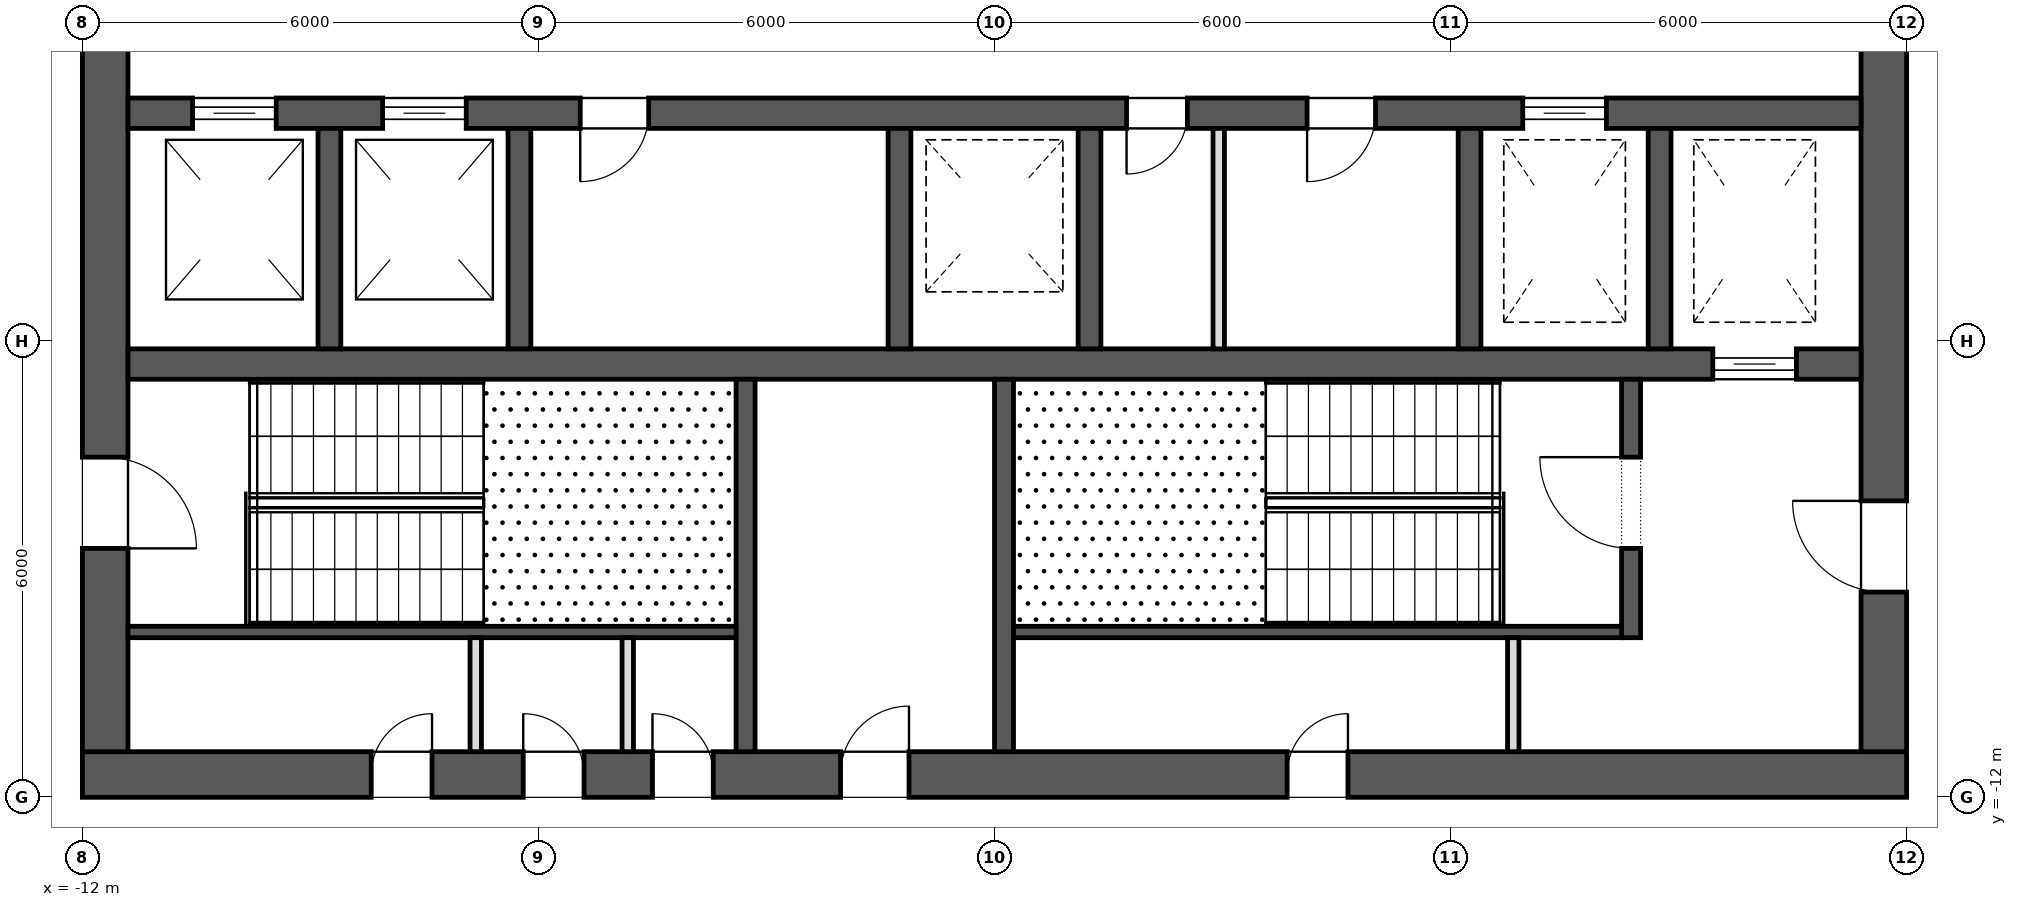
"""IFC4 building model, lengths in metres.
Left out: names, types, materials, properties, quantities, classifications, styles, units other than length and angle.
Written with IfcOpenShell. Run it as: python <this file> out.ifc"""

import sys

from ifc_helpers import new_model, si_unit, direction, frame, frame_2d, origin, place, context, subcontext, project, spatial, rectangle, extrude, element, fill, save


model = new_model("IFC4")
c1 = context("Model", 3, precision=1e-05, world=origin(), true_north=direction((0.0, 1.0)))
c2 = subcontext(c1, "Body", "Model", "MODEL_VIEW")
j1 = project(units=[si_unit("LENGTHUNIT", "METRE"), si_unit("PLANEANGLEUNIT", "RADIAN")], contexts=[c1])
p1 = place(None, origin())
s1 = spatial("IfcSite", under=j1, at=p1, CompositionType="ELEMENT")
p2 = place(p1, origin())
s2 = spatial("IfcBuilding", under=s1, at=p2, CompositionType="ELEMENT")
p3 = place(p2, frame((0.0, 0.0, 312.3)))
s3 = spatial("IfcBuildingStorey", under=s2, at=p3, CompositionType="ELEMENT", Elevation=312.3)
p4 = place(p3, frame((-12.0, -11.7, 0.0), z_axis=(0.0, 0.0, 1.0), x_axis=(1.0, 0.0, 0.0)))
e1 = element("IfcWall", 1, at=p4, inside=s3, PredefinedType="SHEAR", context=c2, shape_type="SweptSolid", body=[
    extrude(rectangle(XDim=24.0, YDim=0.6, at=frame_2d((12.0, 0.0))), origin(), (0.0, 0.0, 1.0), 4.0),
])
p5 = place(p4, frame((9.975, 0.0, 0.0)))
e2 = element("IfcOpeningElement", 2, at=p5, cuts=e1, PredefinedType="OPENING", context=c2, shape_type="SweptSolid", body=[
    extrude(rectangle(XDim=0.9, YDim=2.1, at=frame_2d((0.45, 1.05))), frame((0.0, 0.312, 0.0), z_axis=(0.0, -1.0, 0.0), x_axis=(1.0, 0.0, 0.0)), (0.0, 0.0, 1.0), 0.624),
])
p6 = place(p4, frame((3.8, 0.0, 0.0)))
e3 = element("IfcOpeningElement", 3, at=p6, cuts=e1, PredefinedType="OPENING", context=c2, shape_type="SweptSolid", body=[
    extrude(rectangle(XDim=0.8, YDim=2.1, at=frame_2d((0.4, 1.05))), frame((0.0, 0.312, 0.0), z_axis=(0.0, -1.0, 0.0), x_axis=(1.0, 0.0, 0.0)), (0.0, 0.0, 1.0), 0.624),
])
p7 = place(p4, frame((5.8, 0.0, 0.0)))
e4 = element("IfcOpeningElement", 4, at=p7, cuts=e1, PredefinedType="OPENING", context=c2, shape_type="SweptSolid", body=[
    extrude(rectangle(XDim=0.8, YDim=2.1, at=frame_2d((0.4, 1.05))), frame((0.0, 0.312, 0.0), z_axis=(0.0, -1.0, 0.0), x_axis=(1.0, 0.0, 0.0)), (0.0, 0.0, 1.0), 0.624),
])
p8 = place(p4, frame((7.5, 0.0, 0.0)))
e5 = element("IfcOpeningElement", 5, at=p8, cuts=e1, PredefinedType="OPENING", context=c2, shape_type="SweptSolid", body=[
    extrude(rectangle(XDim=0.8, YDim=2.1, at=frame_2d((0.4, 1.05))), frame((0.0, 0.312, 0.0), z_axis=(0.0, -1.0, 0.0), x_axis=(1.0, 0.0, 0.0)), (0.0, 0.0, 1.0), 0.624),
])
p9 = place(p4, frame((15.85, 0.0, 0.0)))
e6 = element("IfcOpeningElement", 6, at=p9, cuts=e1, PredefinedType="OPENING", context=c2, shape_type="SweptSolid", body=[
    extrude(rectangle(XDim=0.8, YDim=2.1, at=frame_2d((0.4, 1.05))), frame((0.0, 0.312, 0.0), z_axis=(0.0, -1.0, 0.0), x_axis=(1.0, 0.0, 0.0)), (0.0, 0.0, 1.0), 0.624),
])
p10 = place(p3, frame((11.7, -11.4, 0.0), z_axis=(0.0, 0.0, 1.0), x_axis=(0.0, 1.0, 0.0)))
e7 = element("IfcWall", 7, at=p10, inside=s3, PredefinedType="SHEAR", context=c2, shape_type="SweptSolid", body=[
    extrude(rectangle(XDim=22.8, YDim=0.6, at=frame_2d((11.4, 0.0))), origin(), (0.0, 0.0, 1.0), 4.0),
])
p11 = place(p10, frame((10.2, 0.0, 0.0)))
e8 = element("IfcOpeningElement", 8, at=p11, cuts=e7, PredefinedType="OPENING", context=c2, shape_type="SweptSolid", body=[
    extrude(rectangle(XDim=2.4, YDim=2.1, at=frame_2d((1.2, 1.05))), frame((0.0, 0.312, 0.0), z_axis=(0.0, -1.0, 0.0), x_axis=(1.0, 0.0, 0.0)), (0.0, 0.0, 1.0), 0.624),
])
p12 = place(p10, frame((19.5, 0.0, 0.0)))
e9 = element("IfcOpeningElement", 9, at=p12, cuts=e7, PredefinedType="OPENING", context=c2, shape_type="SweptSolid", body=[
    extrude(rectangle(XDim=1.2, YDim=2.1, at=frame_2d((0.6, 1.05))), frame((0.0, 0.312, 0.0), z_axis=(0.0, -1.0, 0.0), x_axis=(1.0, 0.0, 0.0)), (0.0, 0.0, 1.0), 0.624),
])
p13 = place(p10, frame((2.1, 0.0, 0.0)))
e10 = element("IfcOpeningElement", 10, at=p13, cuts=e7, PredefinedType="OPENING", context=c2, shape_type="SweptSolid", body=[
    extrude(rectangle(XDim=1.2, YDim=2.1, at=frame_2d((0.6, 1.05))), frame((0.0, 0.312, 0.0), z_axis=(0.0, -1.0, 0.0), x_axis=(1.0, 0.0, 0.0)), (0.0, 0.0, 1.0), 0.624),
])
p14 = place(p3, frame((-11.7, -11.4, 0.0), z_axis=(0.0, 0.0, 1.0), x_axis=(0.0, 1.0, 0.0)))
e11 = element("IfcWall", 11, at=p14, inside=s3, PredefinedType="SHEAR", context=c2, shape_type="SweptSolid", body=[
    extrude(rectangle(XDim=22.8, YDim=0.6, at=frame_2d((11.4, 0.0))), origin(), (0.0, 0.0, 1.0), 4.0),
])
p15 = place(p14, frame((10.2, 0.0, 0.0)))
e12 = element("IfcOpeningElement", 12, at=p15, cuts=e11, PredefinedType="OPENING", context=c2, shape_type="SweptSolid", body=[
    extrude(rectangle(XDim=2.4, YDim=2.1, at=frame_2d((1.2, 1.05))), frame((0.0, 0.312, 0.0), z_axis=(0.0, -1.0, 0.0), x_axis=(1.0, 0.0, 0.0)), (0.0, 0.0, 1.0), 0.624),
])
p16 = place(p14, frame((18.925, 0.0, 0.0)))
e13 = element("IfcOpeningElement", 13, at=p16, cuts=e11, PredefinedType="OPENING", context=c2, shape_type="SweptSolid", body=[
    extrude(rectangle(XDim=1.2, YDim=2.1, at=frame_2d((0.6, 1.05))), frame((0.0, 0.312, 0.0), z_axis=(0.0, -1.0, 0.0), x_axis=(1.0, 0.0, 0.0)), (0.0, 0.0, 1.0), 0.624),
])
p17 = place(p14, frame((2.675, 0.0, 0.0)))
e14 = element("IfcOpeningElement", 14, at=p17, cuts=e11, PredefinedType="OPENING", context=c2, shape_type="SweptSolid", body=[
    extrude(rectangle(XDim=1.2, YDim=2.1, at=frame_2d((0.6, 1.05))), frame((0.0, 0.312, 0.0), z_axis=(0.0, -1.0, 0.0), x_axis=(1.0, 0.0, 0.0)), (0.0, 0.0, 1.0), 0.624),
])
p18 = place(p3, frame((-11.4, -3.0, 0.0), z_axis=(0.0, 0.0, 1.0), x_axis=(1.0, 0.0, 0.0)))
e15 = element("IfcWall", 15, at=p18, inside=s3, PredefinedType="SHEAR", context=c2, shape_type="SweptSolid", body=[
    extrude(rectangle(XDim=22.8, YDim=0.4, at=frame_2d((11.4, 0.0))), origin(), (0.0, 0.0, 1.0), 4.0),
])
p19 = place(p18, frame((0.85, 0.0, 0.0)))
e16 = element("IfcOpeningElement", 16, at=p19, cuts=e15, PredefinedType="OPENING", context=c2, shape_type="SweptSolid", body=[
    extrude(rectangle(XDim=1.1, YDim=2.1, at=frame_2d((0.55, 1.05))), frame((0.0, 0.212, 0.0), z_axis=(0.0, -1.0, 0.0), x_axis=(1.0, 0.0, 0.0)), (0.0, 0.0, 1.0), 0.424),
])
p20 = place(p18, frame((3.35, 0.0, 0.0)))
e17 = element("IfcOpeningElement", 17, at=p20, cuts=e15, PredefinedType="OPENING", context=c2, shape_type="SweptSolid", body=[
    extrude(rectangle(XDim=1.1, YDim=2.1, at=frame_2d((0.55, 1.05))), frame((0.0, 0.212, 0.0), z_axis=(0.0, -1.0, 0.0), x_axis=(1.0, 0.0, 0.0)), (0.0, 0.0, 1.0), 0.424),
])
p21 = place(p18, frame((18.35, 0.0, 0.0)))
e18 = element("IfcOpeningElement", 18, at=p21, cuts=e15, PredefinedType="OPENING", context=c2, shape_type="SweptSolid", body=[
    extrude(rectangle(XDim=1.1, YDim=2.1, at=frame_2d((0.55, 1.05))), frame((0.0, 0.212, 0.0), z_axis=(0.0, -1.0, 0.0), x_axis=(1.0, 0.0, 0.0)), (0.0, 0.0, 1.0), 0.424),
])
p22 = place(p18, frame((13.137, 0.0, 0.0)))
e19 = element("IfcOpeningElement", 19, at=p22, cuts=e15, PredefinedType="OPENING", context=c2, shape_type="SweptSolid", body=[
    extrude(rectangle(XDim=0.8, YDim=2.1, at=frame_2d((0.4, 1.05))), frame((0.0, 0.212, 0.0), z_axis=(0.0, -1.0, 0.0), x_axis=(1.0, 0.0, 0.0)), (0.0, 0.0, 1.0), 0.424),
])
p23 = place(p18, frame((15.512, 0.0, 0.0)))
e20 = element("IfcOpeningElement", 20, at=p23, cuts=e15, PredefinedType="OPENING", context=c2, shape_type="SweptSolid", body=[
    extrude(rectangle(XDim=0.9, YDim=2.1, at=frame_2d((0.45, 1.05))), frame((0.0, 0.212, 0.0), z_axis=(0.0, -1.0, 0.0), x_axis=(1.0, 0.0, 0.0)), (0.0, 0.0, 1.0), 0.424),
])
p24 = place(p18, frame((5.95, 0.0, 0.0)))
e21 = element("IfcOpeningElement", 21, at=p24, cuts=e15, PredefinedType="OPENING", context=c2, shape_type="SweptSolid", body=[
    extrude(rectangle(XDim=0.9, YDim=2.1, at=frame_2d((0.45, 1.05))), frame((0.0, 0.212, 0.0), z_axis=(0.0, -1.0, 0.0), x_axis=(1.0, 0.0, 0.0)), (0.0, 0.0, 1.0), 0.424),
])
p25 = place(p3, frame((-11.4, -6.3, 0.0), z_axis=(0.0, 0.0, 1.0), x_axis=(1.0, 0.0, 0.0)))
e22 = element("IfcWall", 22, at=p25, inside=s3, PredefinedType="SHEAR", context=c2, shape_type="SweptSolid", body=[
    extrude(rectangle(XDim=22.8, YDim=0.4, at=frame_2d((11.4, 0.0))), origin(), (0.0, 0.0, 1.0), 4.0),
])
p26 = place(p25, frame((20.85, 0.0, 0.0)))
e23 = element("IfcOpeningElement", 23, at=p26, cuts=e22, PredefinedType="OPENING", context=c2, shape_type="SweptSolid", body=[
    extrude(rectangle(XDim=1.1, YDim=2.1, at=frame_2d((0.55, 1.05))), frame((0.0, 0.212, 0.0), z_axis=(0.0, -1.0, 0.0), x_axis=(1.0, 0.0, 0.0)), (0.0, 0.0, 1.0), 0.424),
])
for number, where, z_axis, x_axis in (
    (24, (-8.75, -6.1, 0.0), (0.0, 0.0, 1.0), (0.0, 1.0, 0.0)),
    (25, (-6.25, -6.1, 0.0), (0.0, 0.0, 1.0), (0.0, 1.0, 0.0)),
    (26, (-1.25, -6.1, 0.0), (0.0, 0.0, 1.0), (0.0, 1.0, 0.0)),
    (27, (1.25, -6.1, 0.0), (0.0, 0.0, 1.0), (0.0, 1.0, 0.0)),
    (28, (6.25, -6.1, 0.0), (0.0, 0.0, 1.0), (0.0, 1.0, 0.0)),
    (29, (8.75, -6.1, 0.0), (0.0, 0.0, 1.0), (0.0, 1.0, 0.0)),
):
    element("IfcWall", number, at=place(p3, frame(where, z_axis=z_axis, x_axis=x_axis)), inside=s3, PredefinedType="SHEAR", context=c2, shape_type="SweptSolid", body=[
        extrude(rectangle(XDim=2.9, YDim=0.3, at=frame_2d((1.45, 0.0))), origin(), (0.0, 0.0, 1.0), 4.0),
    ])
for number, where, z_axis, x_axis in (
    (30, (-3.275, -11.4, 0.0), (0.0, 0.0, 1.0), (0.0, 1.0, 0.0)),
    (31, (0.125, -11.4, 0.0), (0.0, 0.0, 1.0), (0.0, 1.0, 0.0)),
):
    element("IfcWall", number, at=place(p3, frame(where, z_axis=z_axis, x_axis=x_axis)), inside=s3, PredefinedType="SHEAR", context=c2, shape_type="SweptSolid", body=[
        extrude(rectangle(XDim=4.9, YDim=0.25, at=frame_2d((2.45, 0.0))), origin(), (0.0, 0.0, 1.0), 3.7),
    ])
p27 = place(p3, frame((8.375, -9.9, 0.0), z_axis=(0.0, 0.0, 1.0), x_axis=(0.0, 1.0, 0.0)))
e32 = element("IfcWall", 32, at=p27, inside=s3, PredefinedType="SHEAR", context=c2, shape_type="SweptSolid", body=[
    extrude(rectangle(XDim=3.4, YDim=0.25, at=frame_2d((1.7, 0.0))), origin(), (0.0, 0.0, 1.0), 3.7),
])
p28 = place(p27, frame((1.175, 0.0, 0.0)))
e33 = element("IfcOpeningElement", 33, at=p28, cuts=e32, PredefinedType="OPENING", context=c2, shape_type="SweptSolid", body=[
    extrude(rectangle(XDim=1.2, YDim=2.1, at=frame_2d((0.6, 1.05))), frame((0.0, 0.137, 0.0), z_axis=(0.0, -1.0, 0.0), x_axis=(1.0, 0.0, 0.0)), (0.0, 0.0, 1.0), 0.274),
])
for number, where, z_axis, x_axis in (
    (34, (-11.4, -9.825, 0.0), (0.0, 0.0, 1.0), (1.0, 0.0, 0.0)),
    (35, (0.25, -9.825, 0.0), (0.0, 0.0, 1.0), (1.0, 0.0, 0.0)),
):
    element("IfcWall", number, at=place(p3, frame(where, z_axis=z_axis, x_axis=x_axis)), inside=s3, PredefinedType="SHEAR", context=c2, shape_type="SweptSolid", body=[
        extrude(rectangle(XDim=8.0, YDim=0.15, at=frame_2d((4.0, 0.0))), origin(), (0.0, 0.0, 1.0), 3.7),
    ])
for number, where, z_axis, x_axis in (
    (36, (-6.825, -11.4, 0.0), (0.0, 0.0, 1.0), (0.0, 1.0, 0.0)),
    (37, (-4.825, -11.4, 0.0), (0.0, 0.0, 1.0), (0.0, 1.0, 0.0)),
    (38, (6.825, -11.4, 0.0), (0.0, 0.0, 1.0), (0.0, 1.0, 0.0)),
):
    element("IfcWall", number, at=place(p3, frame(where, z_axis=z_axis, x_axis=x_axis)), inside=s3, PredefinedType="PARTITIONING", context=c2, shape_type="SweptSolid", body=[
        extrude(rectangle(XDim=1.5, YDim=0.15, at=frame_2d((0.75, 0.0))), origin(), (0.0, 0.0, 1.0), 3.7),
    ])
p29 = place(p3, frame((2.95, -6.1, 0.0), z_axis=(0.0, 0.0, 1.0), x_axis=(0.0, 1.0, 0.0)))
e39 = element("IfcWall", 39, at=p29, inside=s3, PredefinedType="PARTITIONING", context=c2, shape_type="SweptSolid", body=[
    extrude(rectangle(XDim=2.9, YDim=0.15, at=frame_2d((1.45, 0.0))), origin(), (0.0, 0.0, 1.0), 3.7),
])
p30 = place(p26, origin())
e40 = element("IfcDoor", 40, at=p30, inside=s3, OperationType="SLIDING_TO_LEFT", PredefinedType="DOOR", context=c2, shape_type="SweptSolid", body=[
    extrude(rectangle(XDim=1.1, YDim=2.1, at=frame_2d((0.55, 1.05))), frame((0.0, 0.025, 0.0), z_axis=(0.0, -1.0, 0.0), x_axis=(1.0, 0.0, 0.0)), (0.0, 0.0, 1.0), 0.05),
])
fill(e23, e40)
p31 = place(p19, origin())
e41 = element("IfcDoor", 41, at=p31, inside=s3, OperationType="SLIDING_TO_LEFT", PredefinedType="DOOR", context=c2, shape_type="SweptSolid", body=[
    extrude(rectangle(XDim=1.1, YDim=2.1, at=frame_2d((0.55, 1.05))), frame((0.0, 0.025, 0.0), z_axis=(0.0, -1.0, 0.0), x_axis=(1.0, 0.0, 0.0)), (0.0, 0.0, 1.0), 0.05),
])
fill(e16, e41)
p32 = place(p20, origin())
e42 = element("IfcDoor", 42, at=p32, inside=s3, OperationType="SLIDING_TO_LEFT", PredefinedType="DOOR", context=c2, shape_type="SweptSolid", body=[
    extrude(rectangle(XDim=1.1, YDim=2.1, at=frame_2d((0.55, 1.05))), frame((0.0, 0.025, 0.0), z_axis=(0.0, -1.0, 0.0), x_axis=(1.0, 0.0, 0.0)), (0.0, 0.0, 1.0), 0.05),
])
fill(e17, e42)
p33 = place(p21, origin())
e43 = element("IfcDoor", 43, at=p33, inside=s3, OperationType="SLIDING_TO_LEFT", PredefinedType="DOOR", context=c2, shape_type="SweptSolid", body=[
    extrude(rectangle(XDim=1.1, YDim=2.1, at=frame_2d((0.55, 1.05))), frame((0.0, 0.025, 0.0), z_axis=(0.0, -1.0, 0.0), x_axis=(1.0, 0.0, 0.0)), (0.0, 0.0, 1.0), 0.05),
])
fill(e18, e43)
p34 = place(p17, frame((1.2, 0.0, 0.0), z_axis=(0.0, 0.0, 1.0), x_axis=(-1.0, 0.0, 0.0)))
e44 = element("IfcDoor", 44, at=p34, inside=s3, OperationType="SINGLE_SWING_LEFT", PredefinedType="DOOR", context=c2, shape_type="SweptSolid", body=[
    extrude(rectangle(XDim=1.2, YDim=2.1, at=frame_2d((0.6, 1.05))), frame((0.0, 0.025, 0.0), z_axis=(0.0, -1.0, 0.0), x_axis=(1.0, 0.0, 0.0)), (0.0, 0.0, 1.0), 0.05),
])
fill(e14, e44)
p35 = place(p28, origin())
e45 = element("IfcDoor", 45, at=p35, inside=s3, OperationType="SINGLE_SWING_LEFT", PredefinedType="DOOR", context=c2, shape_type="SweptSolid", body=[
    extrude(rectangle(XDim=1.2, YDim=2.1, at=frame_2d((0.6, 1.05))), frame((0.0, 0.025, 0.0), z_axis=(0.0, -1.0, 0.0), x_axis=(1.0, 0.0, 0.0)), (0.0, 0.0, 1.0), 0.05),
])
fill(e33, e45)
p36 = place(p13, origin())
e46 = element("IfcDoor", 46, at=p36, inside=s3, OperationType="SINGLE_SWING_LEFT", PredefinedType="DOOR", context=c2, shape_type="SweptSolid", body=[
    extrude(rectangle(XDim=1.2, YDim=2.1, at=frame_2d((0.6, 1.05))), frame((0.0, 0.025, 0.0), z_axis=(0.0, -1.0, 0.0), x_axis=(1.0, 0.0, 0.0)), (0.0, 0.0, 1.0), 0.05),
])
fill(e10, e46)
p37 = place(p5, origin())
e47 = element("IfcDoor", 47, at=p37, inside=s3, OperationType="SINGLE_SWING_LEFT", PredefinedType="DOOR", context=c2, shape_type="SweptSolid", body=[
    extrude(rectangle(XDim=0.9, YDim=2.1, at=frame_2d((0.45, 1.05))), frame((0.0, 0.025, 0.0), z_axis=(0.0, -1.0, 0.0), x_axis=(1.0, 0.0, 0.0)), (0.0, 0.0, 1.0), 0.05),
])
fill(e2, e47)
p38 = place(p6, origin())
e48 = element("IfcDoor", 48, at=p38, inside=s3, OperationType="SINGLE_SWING_LEFT", PredefinedType="DOOR", context=c2, shape_type="SweptSolid", body=[
    extrude(rectangle(XDim=0.8, YDim=2.1, at=frame_2d((0.4, 1.05))), frame((0.0, 0.025, 0.0), z_axis=(0.0, -1.0, 0.0), x_axis=(1.0, 0.0, 0.0)), (0.0, 0.0, 1.0), 0.05),
])
fill(e3, e48)
p39 = place(p7, origin())
e49 = element("IfcDoor", 49, at=p39, inside=s3, OperationType="SINGLE_SWING_RIGHT", PredefinedType="DOOR", context=c2, shape_type="SweptSolid", body=[
    extrude(rectangle(XDim=0.8, YDim=2.1, at=frame_2d((0.4, 1.05))), frame((0.0, 0.025, 0.0), z_axis=(0.0, -1.0, 0.0), x_axis=(1.0, 0.0, 0.0)), (0.0, 0.0, 1.0), 0.05),
])
fill(e4, e49)
p40 = place(p8, origin())
e50 = element("IfcDoor", 50, at=p40, inside=s3, OperationType="SINGLE_SWING_RIGHT", PredefinedType="DOOR", context=c2, shape_type="SweptSolid", body=[
    extrude(rectangle(XDim=0.8, YDim=2.1, at=frame_2d((0.4, 1.05))), frame((0.0, 0.025, 0.0), z_axis=(0.0, -1.0, 0.0), x_axis=(1.0, 0.0, 0.0)), (0.0, 0.0, 1.0), 0.05),
])
fill(e5, e50)
p41 = place(p9, origin())
e51 = element("IfcDoor", 51, at=p41, inside=s3, OperationType="SINGLE_SWING_LEFT", PredefinedType="DOOR", context=c2, shape_type="SweptSolid", body=[
    extrude(rectangle(XDim=0.8, YDim=2.1, at=frame_2d((0.4, 1.05))), frame((0.0, 0.025, 0.0), z_axis=(0.0, -1.0, 0.0), x_axis=(1.0, 0.0, 0.0)), (0.0, 0.0, 1.0), 0.05),
])
fill(e6, e51)
p42 = place(p22, frame((0.8, 0.0, 0.0), z_axis=(0.0, 0.0, 1.0), x_axis=(-1.0, 0.0, 0.0)))
e52 = element("IfcDoor", 52, at=p42, inside=s3, OperationType="SINGLE_SWING_LEFT", PredefinedType="DOOR", context=c2, shape_type="SweptSolid", body=[
    extrude(rectangle(XDim=0.8, YDim=2.1, at=frame_2d((0.4, 1.05))), frame((0.0, 0.025, 0.0), z_axis=(0.0, -1.0, 0.0), x_axis=(1.0, 0.0, 0.0)), (0.0, 0.0, 1.0), 0.05),
])
fill(e19, e52)
p43 = place(p23, frame((0.9, 0.0, 0.0), z_axis=(0.0, 0.0, 1.0), x_axis=(-1.0, 0.0, 0.0)))
e53 = element("IfcDoor", 53, at=p43, inside=s3, OperationType="SINGLE_SWING_LEFT", PredefinedType="DOOR", context=c2, shape_type="SweptSolid", body=[
    extrude(rectangle(XDim=0.9, YDim=2.1, at=frame_2d((0.45, 1.05))), frame((0.0, 0.025, 0.0), z_axis=(0.0, -1.0, 0.0), x_axis=(1.0, 0.0, 0.0)), (0.0, 0.0, 1.0), 0.05),
])
fill(e20, e53)
p44 = place(p24, frame((0.9, 0.0, 0.0), z_axis=(0.0, 0.0, 1.0), x_axis=(-1.0, 0.0, 0.0)))
e54 = element("IfcDoor", 54, at=p44, inside=s3, OperationType="SINGLE_SWING_LEFT", PredefinedType="DOOR", context=c2, shape_type="SweptSolid", body=[
    extrude(rectangle(XDim=0.9, YDim=2.1, at=frame_2d((0.45, 1.05))), frame((0.0, 0.025, 0.0), z_axis=(0.0, -1.0, 0.0), x_axis=(1.0, 0.0, 0.0)), (0.0, 0.0, 1.0), 0.05),
])
fill(e21, e54)
save(model, sys.argv[1])
